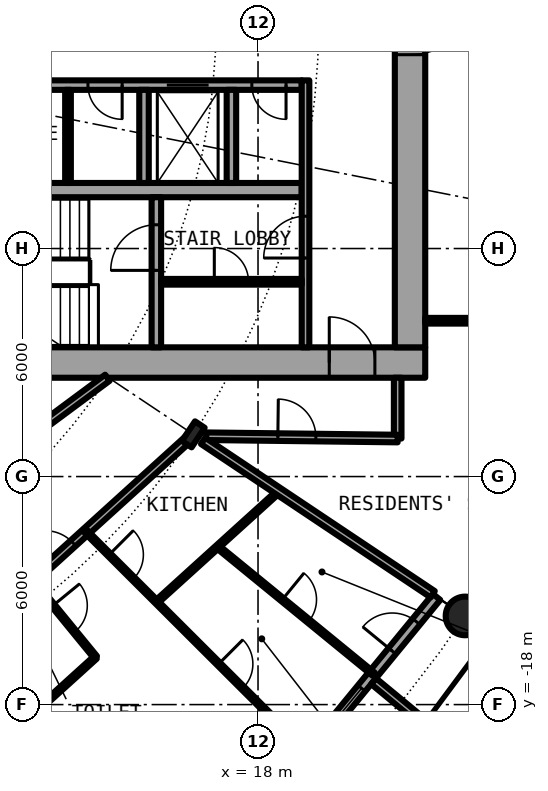
"""IFC4 building model, lengths in metres.
Left out: names, types, materials, properties, quantities, classifications, styles, units other than length and angle.
Written with IfcOpenShell. Run it as: python <this file> out.ifc"""

import sys

from ifc_helpers import new_model, si_unit, direction, frame, frame_2d, origin, origin_2d, place, context, subcontext, project, spatial, rectangle, hollow_circle, i_section, extrude, element, fill, save


model = new_model("IFC4")
c1 = context("Model", 3, precision=1e-05, world=origin(), true_north=direction((0.0, 1.0)))
c2 = subcontext(c1, "Body", "Model", "MODEL_VIEW")
j1 = project(units=[si_unit("LENGTHUNIT", "METRE"), si_unit("PLANEANGLEUNIT", "RADIAN")], contexts=[c1])
p1 = place(None, origin())
s1 = spatial("IfcSite", under=j1, at=p1, CompositionType="ELEMENT")
p2 = place(p1, origin())
s2 = spatial("IfcBuilding", under=s1, at=p2, CompositionType="ELEMENT")
p3 = place(p2, frame((0.0, 0.0, 41.1)))
s3 = spatial("IfcBuildingStorey", under=s2, at=p3, CompositionType="ELEMENT", Elevation=41.1)
p4 = place(p3, frame((23.448, -15.667, 0.0), z_axis=(0.0, 0.0, 1.0), x_axis=(1.0, 0.0, 0.0)))
e1 = element("IfcColumn", 1, at=p4, inside=s3, PredefinedType="COLUMN", context=c2, shape_type="SweptSolid", body=[
    extrude(hollow_circle(Radius=0.508, WallThickness=0.05, at=origin_2d()), origin(), (0.0, 0.0, 1.0), 3.05),
])
p5 = place(p3, frame((16.297, -10.889, 0.0), z_axis=(0.0, 0.0, 1.0), x_axis=(0.831469612303, -0.55557023302, 0.0)))
e2 = element("IfcColumn", 2, at=p5, inside=s3, PredefinedType="COLUMN", context=c2, shape_type="SweptSolid", body=[
    extrude(i_section(OverallWidth=0.305, OverallDepth=0.62, WebThickness=0.021, FlangeThickness=0.04, FilletRadius=0.027, at=origin_2d()), origin(), (0.0, 0.0, 1.0), 3.05),
])
p6 = place(p3, frame((19.304, -19.304, 0.0), z_axis=(0.0, 0.0, 1.0), x_axis=(0.634382322723, 0.773019449054, 0.0)))
e3 = element("IfcWall", 3, at=p6, inside=s3, PredefinedType="SOLIDWALL", context=c2, shape_type="SweptSolid", body=[
    extrude(rectangle(XDim=5.352, YDim=0.25, at=frame_2d((2.676, 0.0))), origin(), (0.0, 0.0, 1.0), 2.7),
])
p7 = place(p6, frame((0.441, 0.0, 0.3)))
e4 = element("IfcOpeningElement", 4, at=p7, cuts=e3, PredefinedType="OPENING", context=c2, shape_type="SweptSolid", body=[
    extrude(rectangle(XDim=1.8, YDim=2.1, at=frame_2d((0.9, 1.05))), frame((0.0, 0.135, 0.0), z_axis=(0.0, -1.0, 0.0), x_axis=(1.0, 0.0, 0.0)), (0.0, 0.0, 1.0), 0.27),
])
p8 = place(p6, frame((3.51, 0.0, 0.0)))
e5 = element("IfcOpeningElement", 5, at=p8, cuts=e3, PredefinedType="OPENING", context=c2, shape_type="SweptSolid", body=[
    extrude(rectangle(XDim=1.0, YDim=2.2, at=frame_2d((0.5, 1.1))), frame((0.0, 0.135, 0.0), z_axis=(0.0, -1.0, 0.0), x_axis=(1.0, 0.0, 0.0)), (0.0, 0.0, 1.0), 0.27),
])
p9 = place(p3, frame((21.041, -17.384, -0.03), z_axis=(0.0, 0.0, 1.0), x_axis=(0.770784861449, -0.63709551667, 0.0)))
e6 = element("IfcWall", 6, at=p9, inside=s3, PredefinedType="SOLIDWALL", context=c2, shape_type="SweptSolid", body=[
    extrude(rectangle(XDim=3.006, YDim=0.2, at=frame_2d((1.503, 0.0))), origin(), (0.0, 0.0, 1.0), 2.73),
])
p10 = place(p3, frame((8.2, -9.0, 0.0), z_axis=(0.0, 0.0, 1.0), x_axis=(1.0, 0.0, 0.0)))
e7 = element("IfcWall", 7, at=p10, inside=s3, PredefinedType="SHEAR", context=c2, shape_type="SweptSolid", body=[
    extrude(rectangle(XDim=14.2, YDim=0.8, at=frame_2d((7.1, 0.0))), origin(), (0.0, 0.0, 1.0), 3.05),
])
p11 = place(p10, frame((11.675, 0.0, 0.0)))
e8 = element("IfcOpeningElement", 8, at=p11, cuts=e7, PredefinedType="OPENING", context=c2, shape_type="SweptSolid", body=[
    extrude(rectangle(XDim=1.2, YDim=2.3, at=frame_2d((0.6, 1.15))), frame((0.0, 0.41, 0.0), z_axis=(0.0, -1.0, 0.0), x_axis=(1.0, 0.0, 0.0)), (0.0, 0.0, 1.0), 0.82),
])
p12 = place(p3, frame((22.0, 8.6, 0.0), z_axis=(0.0, 0.0, 1.0), x_axis=(0.0, -1.0, 0.0)))
e9 = element("IfcWall", 9, at=p12, inside=s3, PredefinedType="SHEAR", context=c2, shape_type="SweptSolid", body=[
    extrude(rectangle(XDim=17.2, YDim=0.8, at=frame_2d((8.6, 0.0))), origin(), (0.0, 0.0, 1.0), 3.05),
])
p13 = place(p12, frame((7.7, 0.0, 0.0)))
e10 = element("IfcOpeningElement", 10, at=p13, cuts=e9, PredefinedType="OPENING", context=c2, shape_type="SweptSolid", body=[
    extrude(rectangle(XDim=1.8, YDim=2.3, at=frame_2d((0.9, 1.15))), frame((0.0, 0.41, 0.0), z_axis=(0.0, -1.0, 0.0), x_axis=(1.0, 0.0, 0.0)), (0.0, 0.0, 1.0), 0.82),
])
p14 = place(p3, frame((19.15, -1.7, 0.0), z_axis=(0.0, 0.0, 1.0), x_axis=(-1.0, 0.0, 0.0)))
e11 = element("IfcWall", 11, at=p14, inside=s3, PredefinedType="SHEAR", context=c2, shape_type="SweptSolid", body=[
    extrude(rectangle(XDim=10.15, YDim=0.25, at=frame_2d((5.075, 0.0))), origin(), (0.0, 0.0, 1.0), 3.05),
])
p15 = place(p14, frame((2.45, 0.0, 0.0)))
e12 = element("IfcOpeningElement", 12, at=p15, cuts=e11, PredefinedType="OPENING", context=c2, shape_type="SweptSolid", body=[
    extrude(rectangle(XDim=1.1, YDim=2.3, at=frame_2d((0.55, 1.15))), frame((0.0, 0.135, 0.0), z_axis=(0.0, -1.0, 0.0), x_axis=(1.0, 0.0, 0.0)), (0.0, 0.0, 1.0), 0.27),
])
p16 = place(p14, frame((8.837, 0.0, 0.0)))
e13 = element("IfcOpeningElement", 13, at=p16, cuts=e11, PredefinedType="OPENING", context=c2, shape_type="SweptSolid", body=[
    extrude(rectangle(XDim=0.9, YDim=2.3, at=frame_2d((0.45, 1.15))), frame((0.0, 0.135, 0.0), z_axis=(0.0, -1.0, 0.0), x_axis=(1.0, 0.0, 0.0)), (0.0, 0.0, 1.0), 0.27),
])
p17 = place(p14, frame((6.8, 0.0, 0.0)))
e14 = element("IfcOpeningElement", 14, at=p17, cuts=e11, PredefinedType="OPENING", context=c2, shape_type="SweptSolid", body=[
    extrude(rectangle(XDim=0.9, YDim=2.3, at=frame_2d((0.45, 1.15))), frame((0.0, 0.135, 0.0), z_axis=(0.0, -1.0, 0.0), x_axis=(1.0, 0.0, 0.0)), (0.0, 0.0, 1.0), 0.27),
])
p18 = place(p14, frame((4.725, 0.0, 0.0)))
e15 = element("IfcOpeningElement", 15, at=p18, cuts=e11, PredefinedType="OPENING", context=c2, shape_type="SweptSolid", body=[
    extrude(rectangle(XDim=0.9, YDim=2.3, at=frame_2d((0.45, 1.15))), frame((0.0, 0.135, 0.0), z_axis=(0.0, -1.0, 0.0), x_axis=(1.0, 0.0, 0.0)), (0.0, 0.0, 1.0), 0.27),
])
p19 = place(p14, frame((0.413, 0.0, 0.0)))
e16 = element("IfcOpeningElement", 16, at=p19, cuts=e11, PredefinedType="OPENING", context=c2, shape_type="SweptSolid", body=[
    extrude(rectangle(XDim=0.9, YDim=2.3, at=frame_2d((0.45, 1.15))), frame((0.0, 0.135, 0.0), z_axis=(0.0, -1.0, 0.0), x_axis=(1.0, 0.0, 0.0)), (0.0, 0.0, 1.0), 0.27),
])
p20 = place(p3, frame((9.0, -4.462, 0.0), z_axis=(0.0, 0.0, 1.0), x_axis=(1.0, 0.0, 0.0)))
e17 = element("IfcWall", 17, at=p20, inside=s3, PredefinedType="SHEAR", context=c2, shape_type="SweptSolid", body=[
    extrude(rectangle(XDim=10.15, YDim=0.375, at=frame_2d((5.075, 0.0))), origin(), (0.0, 0.0, 1.0), 3.05),
])
p21 = place(p3, frame((15.325, -8.6, 0.0), z_axis=(0.0, 0.0, 1.0), x_axis=(0.0, 1.0, 0.0)))
e18 = element("IfcWall", 18, at=p21, inside=s3, PredefinedType="SHEAR", context=c2, shape_type="SweptSolid", body=[
    extrude(rectangle(XDim=3.95, YDim=0.25, at=frame_2d((1.975, 0.0))), origin(), (0.0, 0.0, 1.0), 3.05),
])
p22 = place(p21, frame((2.025, 0.0, 0.0)))
e19 = element("IfcOpeningElement", 19, at=p22, cuts=e18, PredefinedType="OPENING", context=c2, shape_type="SweptSolid", body=[
    extrude(rectangle(XDim=1.2, YDim=2.3, at=frame_2d((0.6, 1.15))), frame((0.0, 0.135, 0.0), z_axis=(0.0, -1.0, 0.0), x_axis=(1.0, 0.0, 0.0)), (0.0, 0.0, 1.0), 0.27),
])
for number, where, z_axis, x_axis in (
    (20, (15.0, -1.825, 0.0), (0.0, 0.0, 1.0), (0.0, -1.0, 0.0)),
    (21, (17.3, -1.825, 0.0), (0.0, 0.0, 1.0), (0.0, -1.0, 0.0)),
):
    element("IfcWall", number, at=place(p3, frame(where, z_axis=z_axis, x_axis=x_axis)), inside=s3, PredefinedType="SOLIDWALL", context=c2, shape_type="SweptSolid", body=[
        extrude(rectangle(XDim=2.45, YDim=0.25, at=frame_2d((1.225, 0.0))), origin(), (0.0, 0.0, 1.0), 2.7),
    ])
p23 = place(p3, frame((19.25, -8.6, 0.0), z_axis=(0.0, 0.0, 1.0), x_axis=(0.0, 1.0, 0.0)))
e22 = element("IfcWall", 22, at=p23, inside=s3, PredefinedType="SOLIDWALL", context=c2, shape_type="SweptSolid", body=[
    extrude(rectangle(XDim=7.025, YDim=0.2, at=frame_2d((3.513, 0.0))), origin(), (0.0, 0.0, 1.0), 2.7),
])
p24 = place(p23, frame((2.35, 0.0, 0.0)))
e23 = element("IfcOpeningElement", 23, at=p24, cuts=e22, PredefinedType="OPENING", context=c2, shape_type="SweptSolid", body=[
    extrude(rectangle(XDim=1.1, YDim=2.3, at=frame_2d((0.55, 1.15))), frame((0.0, 0.11, 0.0), z_axis=(0.0, -1.0, 0.0), x_axis=(1.0, 0.0, 0.0)), (0.0, 0.0, 1.0), 0.22),
])
p25 = place(p3, frame((13.0, -1.825, 0.0), z_axis=(0.0, 0.0, 1.0), x_axis=(0.0, -1.0, 0.0)))
e24 = element("IfcWall", 24, at=p25, inside=s3, PredefinedType="PARTITIONING", context=c2, shape_type="SweptSolid", body=[
    extrude(rectangle(XDim=2.45, YDim=0.15, at=frame_2d((1.225, 0.0))), origin(), (0.0, 0.0, 1.0), 2.7),
])
p26 = place(p3, frame((15.45, -6.875, 0.0), z_axis=(0.0, 0.0, 1.0), x_axis=(1.0, 0.0, 0.0)))
e25 = element("IfcWall", 25, at=p26, inside=s3, PredefinedType="PARTITIONING", context=c2, shape_type="SweptSolid", body=[
    extrude(rectangle(XDim=3.7, YDim=0.15, at=frame_2d((1.85, 0.0))), origin(), (0.0, 0.0, 1.0), 2.7),
])
p27 = place(p26, frame((1.4, 0.0, 0.0)))
e26 = element("IfcOpeningElement", 26, at=p27, cuts=e25, PredefinedType="OPENING", context=c2, shape_type="SweptSolid", body=[
    extrude(rectangle(XDim=0.9, YDim=2.3, at=frame_2d((0.45, 1.15))), frame((0.0, 0.085, 0.0), z_axis=(0.0, -1.0, 0.0), x_axis=(1.0, 0.0, 0.0)), (0.0, 0.0, 1.0), 0.17),
])
p28 = place(p3, frame((22.4, -7.9, 0.0), z_axis=(0.0, 0.0, 1.0), x_axis=(1.0, 0.0, 0.0)))
e27 = element("IfcWall", 27, at=p28, inside=s3, PredefinedType="PARTITIONING", context=c2, shape_type="SweptSolid", body=[
    extrude(rectangle(XDim=2.54, YDim=0.15, at=frame_2d((1.27, 0.0))), origin(), (0.0, 0.0, 1.0), 2.7),
])
p29 = place(p3, frame((21.675, -11.0, 0.0), z_axis=(0.0, 0.0, 1.0), x_axis=(0.0, 1.0, 0.0)))
e28 = element("IfcWall", 28, at=p29, inside=s3, PredefinedType="PARTITIONING", context=c2, shape_type="SweptSolid", body=[
    extrude(rectangle(XDim=1.6, YDim=0.2, at=frame_2d((0.8, 0.0))), origin(), (0.0, 0.0, 1.0), 2.7),
])
p30 = place(p3, frame((10.506, -19.671, 0.0), z_axis=(0.0, 0.0, 1.0), x_axis=(0.741162670015, 0.671325477377, 0.0)))
e29 = element("IfcWall", 29, at=p30, inside=s3, PredefinedType="PARTITIONING", context=c2, shape_type="SweptSolid", body=[
    extrude(rectangle(XDim=4.342, YDim=0.1, at=frame_2d((2.171, 0.0))), origin(), (0.0, 0.0, 1.0), 2.7),
])
p31 = place(p30, frame((0.643, 0.0, 0.0)))
e30 = element("IfcOpeningElement", 30, at=p31, cuts=e29, PredefinedType="OPENING", context=c2, shape_type="SweptSolid", body=[
    extrude(rectangle(XDim=0.9, YDim=2.3, at=frame_2d((0.45, 1.15))), frame((0.0, 0.06, 0.0), z_axis=(0.0, -1.0, 0.0), x_axis=(1.0, 0.0, 0.0)), (0.0, 0.0, 1.0), 0.12),
])
p32 = place(p3, frame((15.33, -15.301, 0.0), z_axis=(0.0, 0.0, 1.0), x_axis=(0.741109646243, 0.671384012504, 0.0)))
e31 = element("IfcWall", 31, at=p32, inside=s3, PredefinedType="PARTITIONING", context=c2, shape_type="SweptSolid", body=[
    extrude(rectangle(XDim=4.331, YDim=0.1, at=frame_2d((2.166, 0.0))), origin(), (0.0, 0.0, 1.0), 2.7),
])
p33 = place(p3, frame((9.239, -17.287, 0.0), z_axis=(0.0, 0.0, 1.0), x_axis=(0.74089212117, 0.671624050186, 0.0)))
e32 = element("IfcWall", 32, at=p33, inside=s3, PredefinedType="PARTITIONING", context=c2, shape_type="SweptSolid", body=[
    extrude(rectangle(XDim=9.368, YDim=0.2, at=frame_2d((4.684, 0.0))), origin(), (0.0, 0.0, 1.0), 2.38),
])
p34 = place(p33, frame((4.263, 0.0, 0.0)))
e33 = element("IfcOpeningElement", 33, at=p34, cuts=e32, PredefinedType="OPENING", context=c2, shape_type="SweptSolid", body=[
    extrude(rectangle(XDim=1.0, YDim=2.3, at=frame_2d((0.5, 1.15))), frame((0.0, 0.11, 0.0), z_axis=(0.0, -1.0, 0.0), x_axis=(1.0, 0.0, 0.0)), (0.0, 0.0, 1.0), 0.22),
])
p35 = place(p3, frame((4.906, -16.172, 0.0), z_axis=(0.0, 0.0, 1.0), x_axis=(0.803202106898, 0.595706618626, 0.0)))
e34 = element("IfcWall", 34, at=p35, inside=s3, PredefinedType="PARTITIONING", context=c2, shape_type="SweptSolid", body=[
    extrude(rectangle(XDim=11.368, YDim=0.2, at=frame_2d((5.684, 0.0))), origin(), (0.0, 0.0, 1.0), 2.7),
])
p36 = place(p35, frame((4.38, 0.0, 0.0)))
e35 = element("IfcOpeningElement", 35, at=p36, cuts=e34, PredefinedType="OPENING", context=c2, shape_type="SweptSolid", body=[
    extrude(rectangle(XDim=1.0, YDim=2.3, at=frame_2d((0.5, 1.15))), frame((0.0, 0.11, 0.0), z_axis=(0.0, -1.0, 0.0), x_axis=(1.0, 0.0, 0.0)), (0.0, 0.0, 1.0), 0.22),
])
p37 = place(p3, frame((16.636, -10.939, 0.0), z_axis=(0.0, 0.0, 1.0), x_axis=(0.999926652916, -0.012111514691, 0.0)))
e36 = element("IfcWall", 36, at=p37, inside=s3, PredefinedType="PARTITIONING", context=c2, shape_type="SweptSolid", body=[
    extrude(rectangle(XDim=5.04, YDim=0.2, at=frame_2d((2.52, 0.0))), origin(), (0.0, 0.0, 1.0), 2.7),
])
p38 = place(p37, frame((1.886, 0.0, 0.0)))
e37 = element("IfcOpeningElement", 37, at=p38, cuts=e36, PredefinedType="OPENING", context=c2, shape_type="SweptSolid", body=[
    extrude(rectangle(XDim=1.0, YDim=2.3, at=frame_2d((0.5, 1.15))), frame((0.0, 0.11, 0.0), z_axis=(0.0, -1.0, 0.0), x_axis=(1.0, 0.0, 0.0)), (0.0, 0.0, 1.0), 0.22),
])
p39 = place(p3, frame((9.239, -17.286, 0.0), z_axis=(0.0, 0.0, 1.0), x_axis=(0.471439510802, -0.881898399848, 0.0)))
e38 = element("IfcWall", 38, at=p39, inside=s3, PredefinedType="PARTITIONING", context=c2, shape_type="SweptSolid", body=[
    extrude(rectangle(XDim=7.575, YDim=0.2, at=frame_2d((3.787, 0.0))), origin(), (0.0, 0.0, 1.0), 2.7),
])
p40 = place(p3, frame((12.062, -14.727, 0.0), z_axis=(0.0, 0.0, 1.0), x_axis=(0.633688798249, -0.773588073185, 0.0)))
e39 = element("IfcWall", 39, at=p40, inside=s3, PredefinedType="PARTITIONING", context=c2, shape_type="SweptSolid", body=[
    extrude(rectangle(XDim=2.623, YDim=0.1, at=frame_2d((1.312, 0.0))), origin(), (0.0, 0.0, 1.0), 2.7),
])
p41 = place(p40, frame((0.861, 0.0, 0.0)))
e40 = element("IfcOpeningElement", 40, at=p41, cuts=e39, PredefinedType="OPENING", context=c2, shape_type="SweptSolid", body=[
    extrude(rectangle(XDim=0.9, YDim=2.3, at=frame_2d((0.45, 1.15))), frame((0.0, 0.06, 0.0), z_axis=(0.0, -1.0, 0.0), x_axis=(1.0, 0.0, 0.0)), (0.0, 0.0, 1.0), 0.12),
])
p42 = place(p3, frame((13.474, -13.448, 0.0), z_axis=(0.0, 0.0, 1.0), x_axis=(0.707901324545, -0.706311344031, 0.0)))
e41 = element("IfcWall", 41, at=p42, inside=s3, PredefinedType="PARTITIONING", context=c2, shape_type="SweptSolid", body=[
    extrude(rectangle(XDim=8.138, YDim=0.1, at=frame_2d((4.069, 0.0))), origin(), (0.0, 0.0, 1.0), 2.7),
])
p43 = place(p42, frame((0.861, 0.0, 0.0)))
e42 = element("IfcOpeningElement", 42, at=p43, cuts=e41, PredefinedType="OPENING", context=c2, shape_type="SweptSolid", body=[
    extrude(rectangle(XDim=0.9, YDim=2.3, at=frame_2d((0.45, 1.15))), frame((0.0, 0.06, 0.0), z_axis=(0.0, -1.0, 0.0), x_axis=(1.0, 0.0, 0.0)), (0.0, 0.0, 1.0), 0.12),
])
p44 = place(p42, frame((4.931, 0.0, 0.0)))
e43 = element("IfcOpeningElement", 43, at=p44, cuts=e41, PredefinedType="OPENING", context=c2, shape_type="SweptSolid", body=[
    extrude(rectangle(XDim=0.9, YDim=2.3, at=frame_2d((0.45, 1.15))), frame((0.0, 0.06, 0.0), z_axis=(0.0, -1.0, 0.0), x_axis=(1.0, 0.0, 0.0)), (0.0, 0.0, 1.0), 0.12),
])
p45 = place(p3, frame((16.555, -11.061, 0.0), z_axis=(0.0, 0.0, 1.0), x_axis=(0.831507055747, -0.555514190857, 0.0)))
e44 = element("IfcWall", 44, at=p45, inside=s3, PredefinedType="PARTITIONING", context=c2, shape_type="SweptSolid", body=[
    extrude(rectangle(XDim=7.265, YDim=0.2, at=frame_2d((3.633, 0.0))), origin(), (0.0, 0.0, 1.0), 2.7),
])
p46 = place(p3, frame((16.936, -13.845, 0.0), z_axis=(0.0, 0.0, 1.0), x_axis=(0.774310172558, -0.632806255241, 0.0)))
e45 = element("IfcWall", 45, at=p46, inside=s3, PredefinedType="PARTITIONING", context=c2, shape_type="SweptSolid", body=[
    extrude(rectangle(XDim=5.3, YDim=0.1, at=frame_2d((2.65, 0.0))), origin(), (0.0, 0.0, 1.0), 2.7),
])
p47 = place(p46, frame((2.2, 0.0, 0.0)))
e46 = element("IfcOpeningElement", 46, at=p47, cuts=e45, PredefinedType="OPENING", context=c2, shape_type="SweptSolid", body=[
    extrude(rectangle(XDim=0.9, YDim=2.3, at=frame_2d((0.45, 1.15))), frame((0.0, 0.06, 0.0), z_axis=(0.0, -1.0, 0.0), x_axis=(1.0, 0.0, 0.0)), (0.0, 0.0, 1.0), 0.12),
])
p48 = place(p7, origin())
e47 = element("IfcWindow", 47, at=p48, inside=s3, PartitioningType="SINGLE_PANEL", PredefinedType="WINDOW", context=c2, shape_type="SweptSolid", body=[
    extrude(rectangle(XDim=1.8, YDim=2.1, at=frame_2d((0.9, 1.05))), frame((0.0, 0.03, 0.0), z_axis=(0.0, -1.0, 0.0), x_axis=(1.0, 0.0, 0.0)), (0.0, 0.0, 1.0), 0.06),
])
fill(e4, e47)
p49 = place(p8, origin())
e48 = element("IfcDoor", 48, at=p49, inside=s3, OperationType="SINGLE_SWING_LEFT", PredefinedType="DOOR", context=c2, shape_type="SweptSolid", body=[
    extrude(rectangle(XDim=1.0, YDim=2.2, at=frame_2d((0.5, 1.1))), frame((0.0, 0.025, 0.0), z_axis=(0.0, -1.0, 0.0), x_axis=(1.0, 0.0, 0.0)), (0.0, 0.0, 1.0), 0.05),
])
fill(e5, e48)
p50 = place(p15, origin())
e49 = element("IfcDoor", 49, at=p50, inside=s3, OperationType="DOUBLE_DOOR_SLIDING", PredefinedType="DOOR", context=c2, shape_type="SweptSolid", body=[
    extrude(rectangle(XDim=1.1, YDim=2.3, at=frame_2d((0.55, 1.15))), frame((0.0, 0.025, 0.0), z_axis=(0.0, -1.0, 0.0), x_axis=(1.0, 0.0, 0.0)), (0.0, 0.0, 1.0), 0.05),
])
fill(e12, e49)
p51 = place(p18, origin())
e50 = element("IfcDoor", 50, at=p51, inside=s3, OperationType="SINGLE_SWING_LEFT", PredefinedType="DOOR", context=c2, shape_type="SweptSolid", body=[
    extrude(rectangle(XDim=0.9, YDim=2.3, at=frame_2d((0.45, 1.15))), frame((0.0, 0.025, 0.0), z_axis=(0.0, -1.0, 0.0), x_axis=(1.0, 0.0, 0.0)), (0.0, 0.0, 1.0), 0.05),
])
fill(e15, e50)
p52 = place(p19, origin())
e51 = element("IfcDoor", 51, at=p52, inside=s3, OperationType="SINGLE_SWING_RIGHT", PredefinedType="DOOR", context=c2, shape_type="SweptSolid", body=[
    extrude(rectangle(XDim=0.9, YDim=2.3, at=frame_2d((0.45, 1.15))), frame((0.0, 0.025, 0.0), z_axis=(0.0, -1.0, 0.0), x_axis=(1.0, 0.0, 0.0)), (0.0, 0.0, 1.0), 0.05),
])
fill(e16, e51)
p53 = place(p27, origin())
e52 = element("IfcDoor", 52, at=p53, inside=s3, OperationType="SINGLE_SWING_LEFT", PredefinedType="DOOR", context=c2, shape_type="SweptSolid", body=[
    extrude(rectangle(XDim=0.9, YDim=2.3, at=frame_2d((0.45, 1.15))), frame((0.0, 0.025, 0.0), z_axis=(0.0, -1.0, 0.0), x_axis=(1.0, 0.0, 0.0)), (0.0, 0.0, 1.0), 0.05),
])
fill(e26, e52)
p54 = place(p22, origin())
e53 = element("IfcDoor", 53, at=p54, inside=s3, OperationType="SINGLE_SWING_LEFT", PredefinedType="DOOR", context=c2, shape_type="SweptSolid", body=[
    extrude(rectangle(XDim=1.2, YDim=2.3, at=frame_2d((0.6, 1.15))), frame((0.0, 0.025, 0.0), z_axis=(0.0, -1.0, 0.0), x_axis=(1.0, 0.0, 0.0)), (0.0, 0.0, 1.0), 0.05),
])
fill(e19, e53)
p55 = place(p24, origin())
e54 = element("IfcDoor", 54, at=p55, inside=s3, OperationType="SINGLE_SWING_RIGHT", PredefinedType="DOOR", context=c2, shape_type="SweptSolid", body=[
    extrude(rectangle(XDim=1.1, YDim=2.3, at=frame_2d((0.55, 1.15))), frame((0.0, 0.025, 0.0), z_axis=(0.0, -1.0, 0.0), x_axis=(1.0, 0.0, 0.0)), (0.0, 0.0, 1.0), 0.05),
])
fill(e23, e54)
p56 = place(p11, origin())
e55 = element("IfcDoor", 55, at=p56, inside=s3, OperationType="SINGLE_SWING_LEFT", PredefinedType="DOOR", context=c2, shape_type="SweptSolid", body=[
    extrude(rectangle(XDim=1.2, YDim=2.3, at=frame_2d((0.6, 1.15))), frame((0.0, 0.025, 0.0), z_axis=(0.0, -1.0, 0.0), x_axis=(1.0, 0.0, 0.0)), (0.0, 0.0, 1.0), 0.05),
])
fill(e8, e55)
p57 = place(p13, origin())
e56 = element("IfcDoor", 56, at=p57, inside=s3, OperationType="SINGLE_SWING_LEFT", PredefinedType="DOOR", context=c2, shape_type="SweptSolid", body=[
    extrude(rectangle(XDim=1.8, YDim=2.3, at=frame_2d((0.9, 1.15))), frame((0.0, 0.025, 0.0), z_axis=(0.0, -1.0, 0.0), x_axis=(1.0, 0.0, 0.0)), (0.0, 0.0, 1.0), 0.05),
])
fill(e10, e56)
p58 = place(p34, origin())
e57 = element("IfcDoor", 57, at=p58, inside=s3, OperationType="SINGLE_SWING_RIGHT", PredefinedType="DOOR", context=c2, shape_type="SweptSolid", body=[
    extrude(rectangle(XDim=1.0, YDim=2.3, at=frame_2d((0.5, 1.15))), frame((0.0, 0.025, 0.0), z_axis=(0.0, -1.0, 0.0), x_axis=(1.0, 0.0, 0.0)), (0.0, 0.0, 1.0), 0.05),
])
fill(e33, e57)
p59 = place(p41, origin())
e58 = element("IfcDoor", 58, at=p59, inside=s3, OperationType="SINGLE_SWING_LEFT", PredefinedType="DOOR", context=c2, shape_type="SweptSolid", body=[
    extrude(rectangle(XDim=0.9, YDim=2.3, at=frame_2d((0.45, 1.15))), frame((0.0, 0.025, 0.0), z_axis=(0.0, -1.0, 0.0), x_axis=(1.0, 0.0, 0.0)), (0.0, 0.0, 1.0), 0.05),
])
fill(e40, e58)
p60 = place(p43, origin())
e59 = element("IfcDoor", 59, at=p60, inside=s3, OperationType="SINGLE_SWING_LEFT", PredefinedType="DOOR", context=c2, shape_type="SweptSolid", body=[
    extrude(rectangle(XDim=0.9, YDim=2.3, at=frame_2d((0.45, 1.15))), frame((0.0, 0.025, 0.0), z_axis=(0.0, -1.0, 0.0), x_axis=(1.0, 0.0, 0.0)), (0.0, 0.0, 1.0), 0.05),
])
fill(e42, e59)
p61 = place(p44, origin())
e60 = element("IfcDoor", 60, at=p61, inside=s3, OperationType="SINGLE_SWING_RIGHT", PredefinedType="DOOR", context=c2, shape_type="SweptSolid", body=[
    extrude(rectangle(XDim=0.9, YDim=2.3, at=frame_2d((0.45, 1.15))), frame((0.0, 0.025, 0.0), z_axis=(0.0, -1.0, 0.0), x_axis=(1.0, 0.0, 0.0)), (0.0, 0.0, 1.0), 0.05),
])
fill(e43, e60)
p62 = place(p47, origin())
e61 = element("IfcDoor", 61, at=p62, inside=s3, OperationType="SINGLE_SWING_LEFT", PredefinedType="DOOR", context=c2, shape_type="SweptSolid", body=[
    extrude(rectangle(XDim=0.9, YDim=2.3, at=frame_2d((0.45, 1.15))), frame((0.0, 0.025, 0.0), z_axis=(0.0, -1.0, 0.0), x_axis=(1.0, 0.0, 0.0)), (0.0, 0.0, 1.0), 0.05),
])
fill(e46, e61)
p63 = place(p38, origin())
e62 = element("IfcDoor", 62, at=p63, inside=s3, OperationType="SINGLE_SWING_LEFT", PredefinedType="DOOR", context=c2, shape_type="SweptSolid", body=[
    extrude(rectangle(XDim=1.0, YDim=2.3, at=frame_2d((0.5, 1.15))), frame((0.0, 0.025, 0.0), z_axis=(0.0, -1.0, 0.0), x_axis=(1.0, 0.0, 0.0)), (0.0, 0.0, 1.0), 0.05),
])
fill(e37, e62)
save(model, sys.argv[1])
